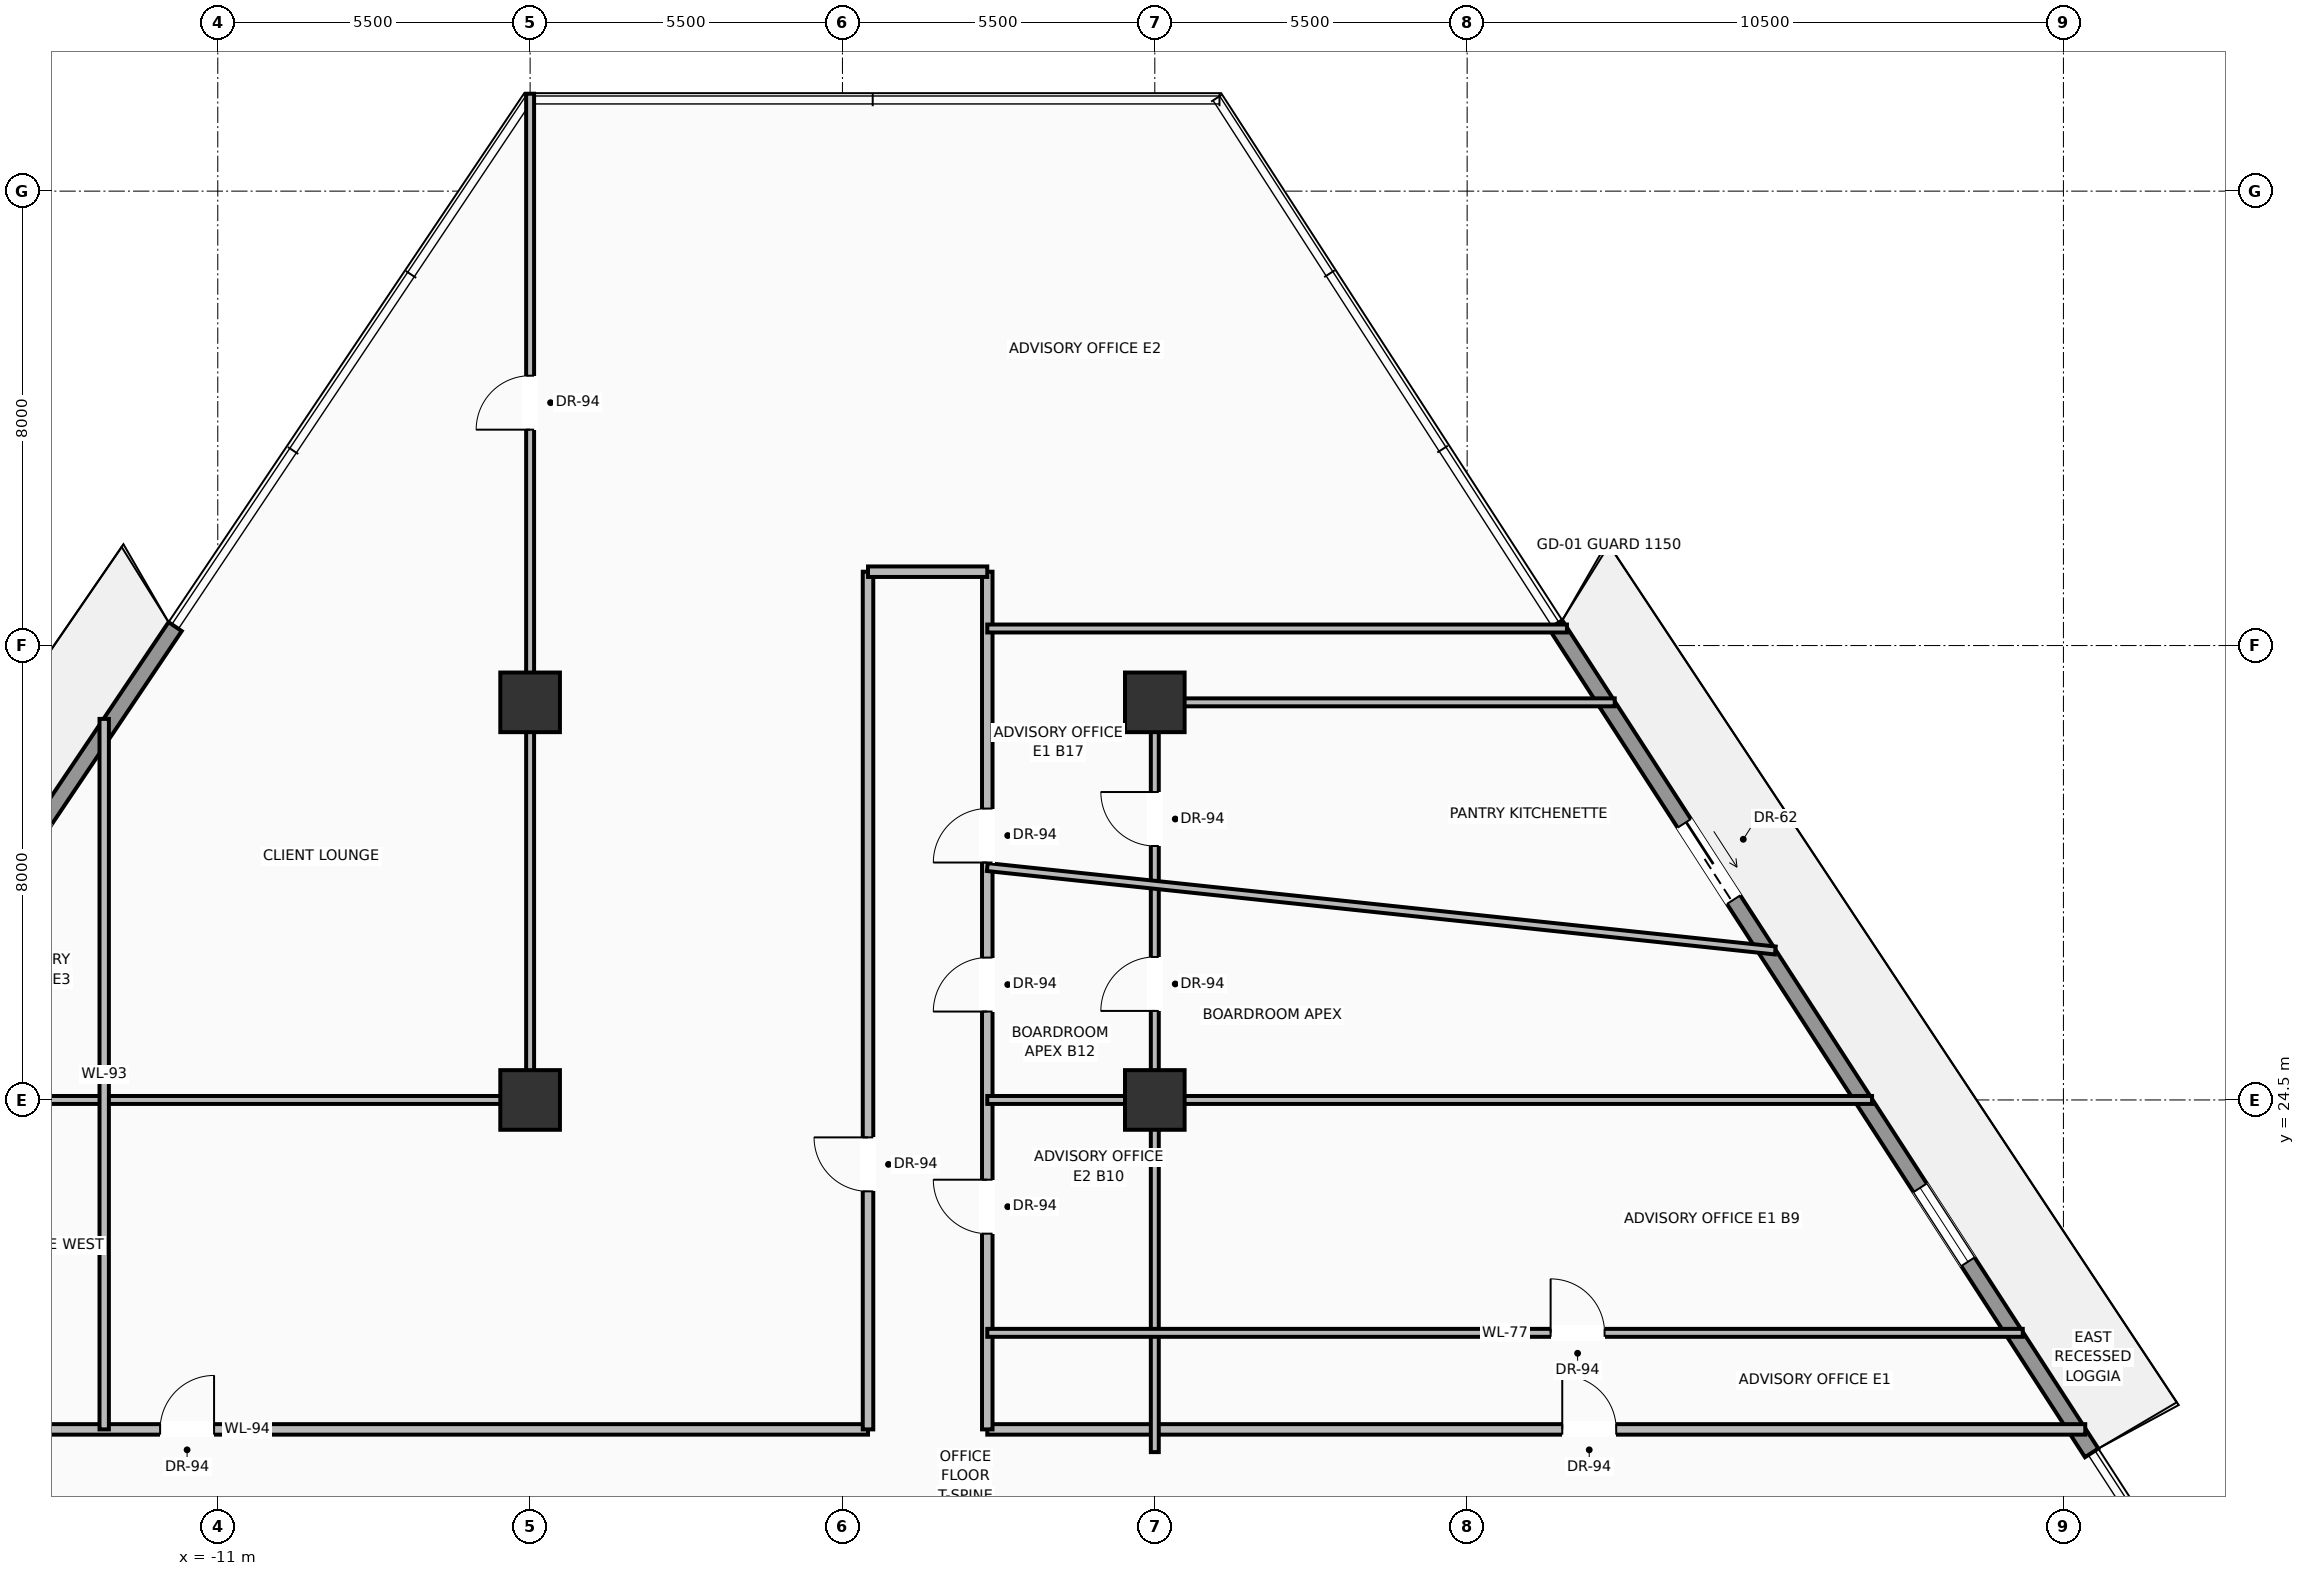
"""IFC4 building model, lengths in metres.
Left out: names, types, materials, properties, quantities, classifications, styles, units other than length and angle.
Written with IfcOpenShell. Run it as: python <this file> out.ifc"""

import sys

from ifc_helpers import new_model, si_unit, direction, frame, frame_2d, origin, origin_2d, place, context, subcontext, project, spatial, rectangle, extrude, source, transform, mapped, element, fill, save


model = new_model("IFC4")
c1 = context("Model", 3, precision=1e-05, world=origin(), true_north=direction((0.0, 1.0)))
c2 = subcontext(c1, "Body", "Model", "MODEL_VIEW")
j1 = project(units=[si_unit("LENGTHUNIT", "METRE"), si_unit("PLANEANGLEUNIT", "RADIAN")], contexts=[c1])
p1 = place(None, origin())
s1 = spatial("IfcSite", under=j1, at=p1, CompositionType="ELEMENT")
p2 = place(p1, origin())
s2 = spatial("IfcBuilding", under=s1, at=p2, CompositionType="ELEMENT")
p3 = place(p2, frame((0.0, 0.0, 95.1)))
s3 = spatial("IfcBuildingStorey", under=s2, at=p3, CompositionType="ELEMENT", Elevation=95.1)
m1 = source(origin(), c2, "Body", "SweptSolid", [
    extrude(rectangle(XDim=1.05, YDim=1.05, at=origin_2d()), origin(), (0.0, 0.0, 1.0), 3.7),
])
for number, where, z_axis, x_axis in (
    (1, (-5.5, 24.5, 0.0), (0.0, 0.0, 1.0), (1.0, 0.0, 0.0)),
    (2, (5.5, 24.5, 0.0), (0.0, 0.0, 1.0), (1.0, 0.0, 0.0)),
    (3, (-5.5, 31.5, 0.0), (0.0, 0.0, 1.0), (1.0, 0.0, 0.0)),
    (4, (5.5, 31.5, 0.0), (0.0, 0.0, 1.0), (1.0, 0.0, 0.0)),
):
    element("IfcColumn", number, at=place(p3, frame(where, z_axis=z_axis, x_axis=x_axis)), inside=s3, PredefinedType="COLUMN", context=c2, shape_type="MappedRepresentation", body=[
        mapped(m1, transform((0.0, 0.0, 0.0), scale=1.0)),
    ])
p4 = place(p3, frame((-21.593, 18.198, 0.0), z_axis=(0.0, 0.0, 1.0), x_axis=(0.558059384835, 0.829801014097, 0.0)))
e5 = element("IfcWall", 5, at=p4, inside=s3, PredefinedType="SOLIDWALL", context=c2, shape_type="SweptSolid", body=[
    extrude(rectangle(XDim=17.637, YDim=0.28, at=frame_2d((8.818, 0.0))), origin(), (0.0, 0.0, 1.0), 3.03),
])
p5 = place(p4, frame((4.233, 0.0, 0.0)))
e6 = element("IfcOpeningElement", 6, at=p5, cuts=e5, PredefinedType="OPENING", context=c2, shape_type="SweptSolid", body=[
    extrude(rectangle(XDim=1.6, YDim=2.35, at=frame_2d((0.8, 1.175))), frame((0.0, 0.15, 0.0), z_axis=(0.0, -1.0, 0.0), x_axis=(1.0, 0.0, 0.0)), (0.0, 0.0, 1.0), 0.3),
])
p6 = place(p4, frame((11.993, 0.0, 0.9)))
e7 = element("IfcOpeningElement", 7, at=p6, cuts=e5, PredefinedType="OPENING", context=c2, shape_type="SweptSolid", body=[
    extrude(rectangle(XDim=1.55, YDim=1.85, at=frame_2d((0.775, 0.925))), frame((0.0, 0.15, 0.0), z_axis=(0.0, -1.0, 0.0), x_axis=(1.0, 0.0, 0.0)), (0.0, 0.0, 1.0), 0.3),
])
p7 = place(p3, frame((12.558, 32.869, 0.0), z_axis=(0.0, 0.0, 1.0), x_axis=(0.543391713386, -0.839479270634, 0.0)))
e8 = element("IfcWall", 8, at=p7, inside=s3, PredefinedType="SOLIDWALL", context=c2, shape_type="SweptSolid", body=[
    extrude(rectangle(XDim=17.371, YDim=0.28, at=frame_2d((8.686, 0.0))), origin(), (0.0, 0.0, 1.0), 3.03),
])
p8 = place(p7, frame((4.169, 0.0, 0.0)))
e9 = element("IfcOpeningElement", 9, at=p8, cuts=e8, PredefinedType="OPENING", context=c2, shape_type="SweptSolid", body=[
    extrude(rectangle(XDim=1.6, YDim=2.35, at=frame_2d((0.8, 1.175))), frame((0.0, 0.15, 0.0), z_axis=(0.0, -1.0, 0.0), x_axis=(1.0, 0.0, 0.0)), (0.0, 0.0, 1.0), 0.3),
])
p9 = place(p7, frame((11.812, 0.0, 0.9)))
e10 = element("IfcOpeningElement", 10, at=p9, cuts=e8, PredefinedType="OPENING", context=c2, shape_type="SweptSolid", body=[
    extrude(rectangle(XDim=1.55, YDim=1.85, at=frame_2d((0.775, 0.925))), frame((0.0, 0.15, 0.0), z_axis=(0.0, -1.0, 0.0), x_axis=(1.0, 0.0, 0.0)), (0.0, 0.0, 1.0), 0.3),
])
p10 = place(p3, frame((-21.412, 18.7, 0.0), z_axis=(0.0, 0.0, 1.0), x_axis=(1.0, 0.0, 0.0)))
e11 = element("IfcWall", 11, at=p10, inside=s3, PredefinedType="PARTITIONING", context=c2, shape_type="SweptSolid", body=[
    extrude(rectangle(XDim=21.862, YDim=0.185, at=frame_2d((10.931, 0.0))), origin(), (0.0, 0.0, 1.0), 2.747),
])
p11 = place(p10, frame((9.397, 0.0, 0.0)))
e12 = element("IfcOpeningElement", 12, at=p11, cuts=e11, PredefinedType="OPENING", context=c2, shape_type="SweptSolid", body=[
    extrude(rectangle(XDim=0.95, YDim=2.2, at=frame_2d((0.475, 1.1))), frame((0.0, 0.103, 0.0), z_axis=(0.0, -1.0, 0.0), x_axis=(1.0, 0.0, 0.0)), (0.0, 0.0, 1.0), 0.205),
])
p12 = place(p10, frame((4.087, 0.0, 0.0)))
e13 = element("IfcOpeningElement", 13, at=p12, cuts=e11, PredefinedType="OPENING", context=c2, shape_type="SweptSolid", body=[
    extrude(rectangle(XDim=0.95, YDim=2.2, at=frame_2d((0.475, 1.1))), frame((0.0, 0.103, 0.0), z_axis=(0.0, -1.0, 0.0), x_axis=(1.0, 0.0, 0.0)), (0.0, 0.0, 1.0), 0.205),
])
p13 = place(p3, frame((2.55, 18.7, 0.0), z_axis=(0.0, 0.0, 1.0), x_axis=(1.0, 0.0, 0.0)))
e14 = element("IfcWall", 14, at=p13, inside=s3, PredefinedType="PARTITIONING", context=c2, shape_type="SweptSolid", body=[
    extrude(rectangle(XDim=19.334, YDim=0.185, at=frame_2d((9.667, 0.0))), origin(), (0.0, 0.0, 1.0), 2.747),
])
p14 = place(p13, frame((10.125, 0.0, 0.0)))
e15 = element("IfcOpeningElement", 15, at=p14, cuts=e14, PredefinedType="OPENING", context=c2, shape_type="SweptSolid", body=[
    extrude(rectangle(XDim=0.95, YDim=2.2, at=frame_2d((0.475, 1.1))), frame((0.0, 0.103, 0.0), z_axis=(0.0, -1.0, 0.0), x_axis=(1.0, 0.0, 0.0)), (0.0, 0.0, 1.0), 0.205),
])
p15 = place(p3, frame((0.45, 18.7, 0.0), z_axis=(0.0, 0.0, 1.0), x_axis=(0.0, 1.0, 0.0)))
e16 = element("IfcWall", 16, at=p15, inside=s3, PredefinedType="PARTITIONING", context=c2, shape_type="SweptSolid", body=[
    extrude(rectangle(XDim=15.1, YDim=0.185, at=frame_2d((7.55, 0.0))), origin(), (0.0, 0.0, 1.0), 2.747),
])
p16 = place(p15, frame((4.191, 0.0, 0.0)))
e17 = element("IfcOpeningElement", 17, at=p16, cuts=e16, PredefinedType="OPENING", context=c2, shape_type="SweptSolid", body=[
    extrude(rectangle(XDim=0.95, YDim=2.2, at=frame_2d((0.475, 1.1))), frame((0.0, 0.103, 0.0), z_axis=(0.0, -1.0, 0.0), x_axis=(1.0, 0.0, 0.0)), (0.0, 0.0, 1.0), 0.205),
])
p17 = place(p3, frame((2.55, 18.7, 0.0), z_axis=(0.0, 0.0, 1.0), x_axis=(0.0, 1.0, 0.0)))
e18 = element("IfcWall", 18, at=p17, inside=s3, PredefinedType="PARTITIONING", context=c2, shape_type="SweptSolid", body=[
    extrude(rectangle(XDim=15.1, YDim=0.185, at=frame_2d((7.55, 0.0))), origin(), (0.0, 0.0, 1.0), 2.747),
])
p18 = place(p17, frame((9.98, 0.0, 0.0)))
e19 = element("IfcOpeningElement", 19, at=p18, cuts=e18, PredefinedType="OPENING", context=c2, shape_type="SweptSolid", body=[
    extrude(rectangle(XDim=0.95, YDim=2.2, at=frame_2d((0.475, 1.1))), frame((0.0, 0.103, 0.0), z_axis=(0.0, -1.0, 0.0), x_axis=(1.0, 0.0, 0.0)), (0.0, 0.0, 1.0), 0.205),
])
p19 = place(p17, frame((3.446, 0.0, 0.0)))
e20 = element("IfcOpeningElement", 20, at=p19, cuts=e18, PredefinedType="OPENING", context=c2, shape_type="SweptSolid", body=[
    extrude(rectangle(XDim=0.95, YDim=2.2, at=frame_2d((0.475, 1.1))), frame((0.0, 0.103, 0.0), z_axis=(0.0, -1.0, 0.0), x_axis=(1.0, 0.0, 0.0)), (0.0, 0.0, 1.0), 0.205),
])
p20 = place(p17, frame((7.356, 0.0, 0.0)))
e21 = element("IfcOpeningElement", 21, at=p20, cuts=e18, PredefinedType="OPENING", context=c2, shape_type="SweptSolid", body=[
    extrude(rectangle(XDim=0.95, YDim=2.2, at=frame_2d((0.475, 1.1))), frame((0.0, 0.103, 0.0), z_axis=(0.0, -1.0, 0.0), x_axis=(1.0, 0.0, 0.0)), (0.0, 0.0, 1.0), 0.205),
])
p21 = place(p3, frame((0.45, 33.8, 0.0), z_axis=(0.0, 0.0, 1.0), x_axis=(1.0, 0.0, 0.0)))
e22 = element("IfcWall", 22, at=p21, inside=s3, PredefinedType="PARTITIONING", context=c2, shape_type="SweptSolid", body=[
    extrude(rectangle(XDim=2.1, YDim=0.185, at=frame_2d((1.05, 0.0))), origin(), (0.0, 0.0, 1.0), 3.442),
])
p22 = place(p3, frame((-5.5, 24.5, 0.0), z_axis=(0.0, 0.0, 1.0), x_axis=(0.0, 1.0, 0.0)))
e23 = element("IfcWall", 23, at=p22, inside=s3, PredefinedType="PARTITIONING", context=c2, shape_type="SweptSolid", body=[
    extrude(rectangle(XDim=17.715, YDim=0.14, at=frame_2d((8.857, 0.0))), origin(), (0.0, 0.0, 1.0), 2.747),
])
p23 = place(p22, frame((11.801, 0.0, 0.0)))
e24 = element("IfcOpeningElement", 24, at=p23, cuts=e23, PredefinedType="OPENING", context=c2, shape_type="SweptSolid", body=[
    extrude(rectangle(XDim=0.95, YDim=2.2, at=frame_2d((0.475, 1.1))), frame((0.0, 0.08, 0.0), z_axis=(0.0, -1.0, 0.0), x_axis=(1.0, 0.0, 0.0)), (0.0, 0.0, 1.0), 0.16),
])
p24 = place(p3, frame((5.5, 18.3, 0.0), z_axis=(0.0, 0.0, 1.0), x_axis=(0.0, 1.0, 0.0)))
e25 = element("IfcWall", 25, at=p24, inside=s3, PredefinedType="PARTITIONING", context=c2, shape_type="SweptSolid", body=[
    extrude(rectangle(XDim=13.2, YDim=0.14, at=frame_2d((6.6, 0.0))), origin(), (0.0, 0.0, 1.0), 2.747),
])
p25 = place(p24, frame((10.671, 0.0, 0.0)))
e26 = element("IfcOpeningElement", 26, at=p25, cuts=e25, PredefinedType="OPENING", context=c2, shape_type="SweptSolid", body=[
    extrude(rectangle(XDim=0.95, YDim=2.2, at=frame_2d((0.475, 1.1))), frame((0.0, 0.08, 0.0), z_axis=(0.0, -1.0, 0.0), x_axis=(1.0, 0.0, 0.0)), (0.0, 0.0, 1.0), 0.16),
])
p26 = place(p24, frame((7.767, 0.0, 0.0)))
e27 = element("IfcOpeningElement", 27, at=p26, cuts=e25, PredefinedType="OPENING", context=c2, shape_type="SweptSolid", body=[
    extrude(rectangle(XDim=0.95, YDim=2.2, at=frame_2d((0.475, 1.1))), frame((0.0, 0.08, 0.0), z_axis=(0.0, -1.0, 0.0), x_axis=(1.0, 0.0, 0.0)), (0.0, 0.0, 1.0), 0.16),
])
p27 = place(p3, frame((-17.512, 24.5, 0.0), z_axis=(0.0, 0.0, 1.0), x_axis=(1.0, 0.0, 0.0)))
e28 = element("IfcWall", 28, at=p27, inside=s3, PredefinedType="PARTITIONING", context=c2, shape_type="SweptSolid", body=[
    extrude(rectangle(XDim=12.012, YDim=0.14, at=frame_2d((6.006, 0.0))), origin(), (0.0, 0.0, 1.0), 2.747),
])
p28 = place(p27, frame((2.129, 0.0, 0.0)))
e29 = element("IfcOpeningElement", 29, at=p28, cuts=e28, PredefinedType="OPENING", context=c2, shape_type="SweptSolid", body=[
    extrude(rectangle(XDim=0.95, YDim=2.2, at=frame_2d((0.475, 1.1))), frame((0.0, 0.08, 0.0), z_axis=(0.0, -1.0, 0.0), x_axis=(1.0, 0.0, 0.0)), (0.0, 0.0, 1.0), 0.16),
])
p29 = place(p3, frame((5.5, 31.5, 0.0), z_axis=(0.0, 0.0, 1.0), x_axis=(1.0, 0.0, 0.0)))
e30 = element("IfcWall", 30, at=p29, inside=s3, PredefinedType="PARTITIONING", context=c2, shape_type="SweptSolid", body=[
    extrude(rectangle(XDim=8.099, YDim=0.14, at=frame_2d((4.049, 0.0))), origin(), (0.0, 0.0, 1.0), 2.747),
])
p30 = place(p3, frame((2.55, 20.4, 0.0), z_axis=(0.0, 0.0, 1.0), x_axis=(1.0, 0.0, 0.0)))
e31 = element("IfcWall", 31, at=p30, inside=s3, PredefinedType="PARTITIONING", context=c2, shape_type="SweptSolid", body=[
    extrude(rectangle(XDim=18.234, YDim=0.14, at=frame_2d((9.117, 0.0))), origin(), (0.0, 0.0, 1.0), 2.747),
])
p31 = place(p30, frame((9.92, 0.0, 0.0)))
e32 = element("IfcOpeningElement", 32, at=p31, cuts=e31, PredefinedType="OPENING", context=c2, shape_type="SweptSolid", body=[
    extrude(rectangle(XDim=0.95, YDim=2.2, at=frame_2d((0.475, 1.1))), frame((0.0, 0.08, 0.0), z_axis=(0.0, -1.0, 0.0), x_axis=(1.0, 0.0, 0.0)), (0.0, 0.0, 1.0), 0.16),
])
p32 = place(p3, frame((2.55, 24.5, 0.0), z_axis=(0.0, 0.0, 1.0), x_axis=(1.0, 0.0, 0.0)))
e33 = element("IfcWall", 33, at=p32, inside=s3, PredefinedType="PARTITIONING", context=c2, shape_type="SweptSolid", body=[
    extrude(rectangle(XDim=15.58, YDim=0.14, at=frame_2d((7.79, 0.0))), origin(), (0.0, 0.0, 1.0), 2.747),
])
p33 = place(p3, frame((2.55, 28.6, 0.0), z_axis=(0.0, 0.0, 1.0), x_axis=(0.994445276421, -0.105254891588, 0.0)))
e34 = element("IfcWall", 34, at=p33, inside=s3, PredefinedType="PARTITIONING", context=c2, shape_type="SweptSolid", body=[
    extrude(rectangle(XDim=13.954, YDim=0.14, at=frame_2d((6.977, 0.0))), origin(), (0.0, 0.0, 1.0), 2.747),
])
p34 = place(p3, frame((2.55, 32.8, 0.0), z_axis=(0.0, 0.0, 1.0), x_axis=(1.0, 0.0, 0.0)))
e35 = element("IfcWall", 35, at=p34, inside=s3, PredefinedType="PARTITIONING", context=c2, shape_type="SweptSolid", body=[
    extrude(rectangle(XDim=10.208, YDim=0.14, at=frame_2d((5.104, 0.0))), origin(), (0.0, 0.0, 1.0), 2.747),
])
p35 = place(p3, frame((-13.0, 18.7, 0.0), z_axis=(0.0, 0.0, 1.0), x_axis=(0.0, 1.0, 0.0)))
e36 = element("IfcWall", 36, at=p35, inside=s3, PredefinedType="PARTITIONING", context=c2, shape_type="SweptSolid", body=[
    extrude(rectangle(XDim=12.509, YDim=0.165, at=frame_2d((6.254, 0.0))), origin(), (0.0, 0.0, 1.0), 2.747),
])
m2 = source(origin(), c2, "Body", "SweptSolid", [
    extrude(rectangle(XDim=1.6, YDim=2.35, at=frame_2d((0.8, 1.175))), frame((0.0, 0.025, 0.0), z_axis=(0.0, -1.0, 0.0), x_axis=(1.0, 0.0, 0.0)), (0.0, 0.0, 1.0), 0.05),
])
p36 = place(p8, origin())
e37 = element("IfcDoor", 37, at=p36, inside=s3, OperationType="SLIDING_TO_RIGHT", PredefinedType="DOOR", context=c2, shape_type="MappedRepresentation", body=[
    mapped(m2, transform((0.0, 0.0, 0.0), scale=1.0)),
])
fill(e9, e37)
m3 = source(origin(), c2, "Body", "SweptSolid", [
    extrude(rectangle(XDim=1.55, YDim=1.85, at=frame_2d((0.775, 0.925))), frame((0.0, 0.03, 0.0), z_axis=(0.0, -1.0, 0.0), x_axis=(1.0, 0.0, 0.0)), (0.0, 0.0, 1.0), 0.06),
])
p37 = place(p9, origin())
e38 = element("IfcWindow", 38, at=p37, inside=s3, PartitioningType="SINGLE_PANEL", PredefinedType="WINDOW", context=c2, shape_type="MappedRepresentation", body=[
    mapped(m3, transform((0.0, 0.0, 0.0), scale=1.0)),
])
fill(e10, e38)
m4 = source(origin(), c2, "Body", "SweptSolid", [
    extrude(rectangle(XDim=0.95, YDim=2.2, at=frame_2d((0.475, 1.1))), frame((0.0, 0.025, 0.0), z_axis=(0.0, -1.0, 0.0), x_axis=(1.0, 0.0, 0.0)), (0.0, 0.0, 1.0), 0.05),
])
p38 = place(p11, origin())
e39 = element("IfcDoor", 39, at=p38, inside=s3, OperationType="SINGLE_SWING_RIGHT", PredefinedType="DOOR", context=c2, shape_type="MappedRepresentation", body=[
    mapped(m4, transform((0.0, 0.0, 0.0), scale=1.0)),
])
fill(e12, e39)
p39 = place(p14, origin())
e40 = element("IfcDoor", 40, at=p39, inside=s3, OperationType="SINGLE_SWING_LEFT", PredefinedType="DOOR", context=c2, shape_type="MappedRepresentation", body=[
    mapped(m4, transform((0.0, 0.0, 0.0), scale=1.0)),
])
fill(e15, e40)
p40 = place(p16, origin())
e41 = element("IfcDoor", 41, at=p40, inside=s3, OperationType="SINGLE_SWING_RIGHT", PredefinedType="DOOR", context=c2, shape_type="MappedRepresentation", body=[
    mapped(m4, transform((0.0, 0.0, 0.0), scale=1.0)),
])
fill(e17, e41)
p41 = place(p18, origin())
e42 = element("IfcDoor", 42, at=p41, inside=s3, OperationType="SINGLE_SWING_LEFT", PredefinedType="DOOR", context=c2, shape_type="MappedRepresentation", body=[
    mapped(m4, transform((0.0, 0.0, 0.0), scale=1.0)),
])
fill(e19, e42)
p42 = place(p31, origin())
e43 = element("IfcDoor", 43, at=p42, inside=s3, OperationType="SINGLE_SWING_LEFT", PredefinedType="DOOR", context=c2, shape_type="MappedRepresentation", body=[
    mapped(m4, transform((0.0, 0.0, 0.0), scale=1.0)),
])
fill(e32, e43)
p43 = place(p19, origin())
e44 = element("IfcDoor", 44, at=p43, inside=s3, OperationType="SINGLE_SWING_RIGHT", PredefinedType="DOOR", context=c2, shape_type="MappedRepresentation", body=[
    mapped(m4, transform((0.0, 0.0, 0.0), scale=1.0)),
])
fill(e20, e44)
p44 = place(p20, origin())
e45 = element("IfcDoor", 45, at=p44, inside=s3, OperationType="SINGLE_SWING_LEFT", PredefinedType="DOOR", context=c2, shape_type="MappedRepresentation", body=[
    mapped(m4, transform((0.0, 0.0, 0.0), scale=1.0)),
])
fill(e21, e45)
p45 = place(p25, origin())
e46 = element("IfcDoor", 46, at=p45, inside=s3, OperationType="SINGLE_SWING_RIGHT", PredefinedType="DOOR", context=c2, shape_type="MappedRepresentation", body=[
    mapped(m4, transform((0.0, 0.0, 0.0), scale=1.0)),
])
fill(e26, e46)
p46 = place(p23, origin())
e47 = element("IfcDoor", 47, at=p46, inside=s3, OperationType="SINGLE_SWING_LEFT", PredefinedType="DOOR", context=c2, shape_type="MappedRepresentation", body=[
    mapped(m4, transform((0.0, 0.0, 0.0), scale=1.0)),
])
fill(e24, e47)
p47 = place(p26, origin())
e48 = element("IfcDoor", 48, at=p47, inside=s3, OperationType="SINGLE_SWING_LEFT", PredefinedType="DOOR", context=c2, shape_type="MappedRepresentation", body=[
    mapped(m4, transform((0.0, 0.0, 0.0), scale=1.0)),
])
fill(e27, e48)
save(model, sys.argv[1])
